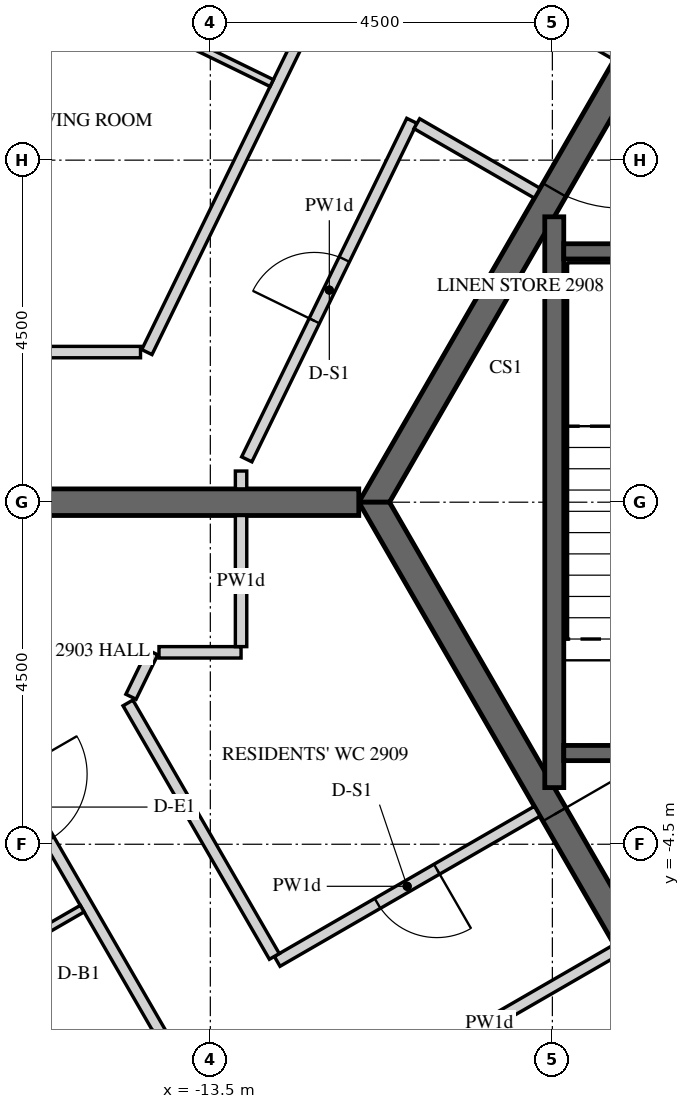
"""IFC4 building model, lengths in metres.
Left out: names, types, materials, properties, quantities, classifications, styles, units other than length and angle.
Written with IfcOpenShell. Run it as: python <this file> out.ifc"""

import sys

from ifc_helpers import new_model, si_unit, direction, frame, frame_2d, origin, place, context, subcontext, project, spatial, polyline, rectangle, outline, extrude, element, fill, save


model = new_model("IFC4")
c1 = context("Model", 3, precision=1e-05, world=origin(), true_north=direction((0.0, 1.0)))
c2 = subcontext(c1, "Body", "Model", "MODEL_VIEW")
j1 = project(units=[si_unit("LENGTHUNIT", "METRE"), si_unit("PLANEANGLEUNIT", "RADIAN")], contexts=[c1])
p1 = place(None, origin())
s1 = spatial("IfcSite", under=j1, at=p1, CompositionType="ELEMENT")
p2 = place(p1, origin())
s2 = spatial("IfcBuilding", under=s1, at=p2, CompositionType="ELEMENT")
p3 = place(p2, frame((0.0, 0.0, 369.0)))
s3 = spatial("IfcBuildingStorey", under=s2, at=p3, CompositionType="ELEMENT", Elevation=369.0)
p4 = place(p3, frame((-14.619, 19.699, -0.15), z_axis=(0.0, 0.0, 1.0), x_axis=(-0.438373747484, -0.898792777851, 0.0)))
e1 = element("IfcWall", 1, at=p4, inside=s3, PredefinedType="SOLIDWALL", context=c2, shape_type="SweptSolid", body=[
    extrude(outline(polyline([(0.225, -0.225), (20.506, -0.225), (20.957, 0.225), (-0.225, 0.225), (0.225, -0.225)])), origin(), (0.0, 0.0, 1.0), 3.9),
])
p5 = place(p4, frame((0.325, 0.0, 1.05)))
e2 = element("IfcOpeningElement", 2, at=p5, cuts=e1, PredefinedType="OPENING", context=c2, shape_type="SweptSolid", body=[
    extrude(rectangle(XDim=0.9, YDim=1.5, at=frame_2d((0.45, 0.75))), frame((0.0, 0.235, 0.0), z_axis=(0.0, -1.0, 0.0), x_axis=(1.0, 0.0, 0.0)), (0.0, 0.0, 1.0), 0.47),
])
p6 = place(p4, frame((1.525, 0.0, 0.15)))
e3 = element("IfcOpeningElement", 3, at=p6, cuts=e1, PredefinedType="OPENING", context=c2, shape_type="SweptSolid", body=[
    extrude(rectangle(XDim=1.2, YDim=2.4, at=frame_2d((0.6, 1.2))), frame((0.0, 0.235, 0.0), z_axis=(0.0, -1.0, 0.0), x_axis=(1.0, 0.0, 0.0)), (0.0, 0.0, 1.0), 0.47),
])
p7 = place(p4, frame((3.766, 0.0, 1.05)))
e4 = element("IfcOpeningElement", 4, at=p7, cuts=e1, PredefinedType="OPENING", context=c2, shape_type="SweptSolid", body=[
    extrude(rectangle(XDim=0.9, YDim=1.5, at=frame_2d((0.45, 0.75))), frame((0.0, 0.235, 0.0), z_axis=(0.0, -1.0, 0.0), x_axis=(1.0, 0.0, 0.0)), (0.0, 0.0, 1.0), 0.47),
])
p8 = place(p4, frame((4.966, 0.0, 0.15)))
e5 = element("IfcOpeningElement", 5, at=p8, cuts=e1, PredefinedType="OPENING", context=c2, shape_type="SweptSolid", body=[
    extrude(rectangle(XDim=1.2, YDim=2.4, at=frame_2d((0.6, 1.2))), frame((0.0, 0.235, 0.0), z_axis=(0.0, -1.0, 0.0), x_axis=(1.0, 0.0, 0.0)), (0.0, 0.0, 1.0), 0.47),
])
p9 = place(p4, frame((7.366, 0.0, 1.05)))
e6 = element("IfcOpeningElement", 6, at=p9, cuts=e1, PredefinedType="OPENING", context=c2, shape_type="SweptSolid", body=[
    extrude(rectangle(XDim=0.9, YDim=1.5, at=frame_2d((0.45, 0.75))), frame((0.0, 0.235, 0.0), z_axis=(0.0, -1.0, 0.0), x_axis=(1.0, 0.0, 0.0)), (0.0, 0.0, 1.0), 0.47),
])
p10 = place(p4, frame((8.566, 0.0, 0.15)))
e7 = element("IfcOpeningElement", 7, at=p10, cuts=e1, PredefinedType="OPENING", context=c2, shape_type="SweptSolid", body=[
    extrude(rectangle(XDim=1.2, YDim=2.4, at=frame_2d((0.6, 1.2))), frame((0.0, 0.235, 0.0), z_axis=(0.0, -1.0, 0.0), x_axis=(1.0, 0.0, 0.0)), (0.0, 0.0, 1.0), 0.47),
])
p11 = place(p4, frame((10.966, 0.0, 1.05)))
e8 = element("IfcOpeningElement", 8, at=p11, cuts=e1, PredefinedType="OPENING", context=c2, shape_type="SweptSolid", body=[
    extrude(rectangle(XDim=0.9, YDim=1.5, at=frame_2d((0.45, 0.75))), frame((0.0, 0.235, 0.0), z_axis=(0.0, -1.0, 0.0), x_axis=(1.0, 0.0, 0.0)), (0.0, 0.0, 1.0), 0.47),
])
p12 = place(p4, frame((12.166, 0.0, 0.15)))
e9 = element("IfcOpeningElement", 9, at=p12, cuts=e1, PredefinedType="OPENING", context=c2, shape_type="SweptSolid", body=[
    extrude(rectangle(XDim=1.2, YDim=2.4, at=frame_2d((0.6, 1.2))), frame((0.0, 0.235, 0.0), z_axis=(0.0, -1.0, 0.0), x_axis=(1.0, 0.0, 0.0)), (0.0, 0.0, 1.0), 0.47),
])
p13 = place(p4, frame((14.566, 0.0, 1.05)))
e10 = element("IfcOpeningElement", 10, at=p13, cuts=e1, PredefinedType="OPENING", context=c2, shape_type="SweptSolid", body=[
    extrude(rectangle(XDim=0.9, YDim=1.5, at=frame_2d((0.45, 0.75))), frame((0.0, 0.235, 0.0), z_axis=(0.0, -1.0, 0.0), x_axis=(1.0, 0.0, 0.0)), (0.0, 0.0, 1.0), 0.47),
])
p14 = place(p4, frame((15.766, 0.0, 0.15)))
e11 = element("IfcOpeningElement", 11, at=p14, cuts=e1, PredefinedType="OPENING", context=c2, shape_type="SweptSolid", body=[
    extrude(rectangle(XDim=1.2, YDim=2.4, at=frame_2d((0.6, 1.2))), frame((0.0, 0.235, 0.0), z_axis=(0.0, -1.0, 0.0), x_axis=(1.0, 0.0, 0.0)), (0.0, 0.0, 1.0), 0.47),
])
p15 = place(p4, frame((18.007, 0.0, 1.05)))
e12 = element("IfcOpeningElement", 12, at=p15, cuts=e1, PredefinedType="OPENING", context=c2, shape_type="SweptSolid", body=[
    extrude(rectangle(XDim=0.9, YDim=1.5, at=frame_2d((0.45, 0.75))), frame((0.0, 0.235, 0.0), z_axis=(0.0, -1.0, 0.0), x_axis=(1.0, 0.0, 0.0)), (0.0, 0.0, 1.0), 0.47),
])
p16 = place(p4, frame((19.207, 0.0, 0.15)))
e13 = element("IfcOpeningElement", 13, at=p16, cuts=e1, PredefinedType="OPENING", context=c2, shape_type="SweptSolid", body=[
    extrude(rectangle(XDim=1.2, YDim=2.4, at=frame_2d((0.6, 1.2))), frame((0.0, 0.235, 0.0), z_axis=(0.0, -1.0, 0.0), x_axis=(1.0, 0.0, 0.0)), (0.0, 0.0, 1.0), 0.47),
])
p17 = place(p3, frame((-25.907, -2.678, -0.15), z_axis=(0.0, 0.0, 1.0), x_axis=(0.499997453958, -0.866026873738, 0.0)))
e14 = element("IfcWall", 14, at=p17, inside=s3, PredefinedType="SOLIDWALL", context=c2, shape_type="SweptSolid", body=[
    extrude(outline(polyline([(-0.018, -0.225), (23.152, -0.225), (23.11, 0.225), (0.018, 0.225), (-0.018, -0.225)])), origin(), (0.0, 0.0, 1.0), 3.9),
])
p18 = place(p17, frame((1.366, 0.0, 0.45)))
e15 = element("IfcOpeningElement", 15, at=p18, cuts=e14, PredefinedType="OPENING", context=c2, shape_type="SweptSolid", body=[
    extrude(rectangle(XDim=2.4, YDim=3.0, at=frame_2d((1.2, 1.5))), frame((0.0, 0.235, 0.0), z_axis=(0.0, -1.0, 0.0), x_axis=(1.0, 0.0, 0.0)), (0.0, 0.0, 1.0), 0.47),
])
p19 = place(p17, frame((4.966, 0.0, 0.45)))
e16 = element("IfcOpeningElement", 16, at=p19, cuts=e14, PredefinedType="OPENING", context=c2, shape_type="SweptSolid", body=[
    extrude(rectangle(XDim=2.4, YDim=3.0, at=frame_2d((1.2, 1.5))), frame((0.0, 0.235, 0.0), z_axis=(0.0, -1.0, 0.0), x_axis=(1.0, 0.0, 0.0)), (0.0, 0.0, 1.0), 0.47),
])
p20 = place(p17, frame((8.566, 0.0, 0.45)))
e17 = element("IfcOpeningElement", 17, at=p20, cuts=e14, PredefinedType="OPENING", context=c2, shape_type="SweptSolid", body=[
    extrude(rectangle(XDim=2.4, YDim=3.0, at=frame_2d((1.2, 1.5))), frame((0.0, 0.235, 0.0), z_axis=(0.0, -1.0, 0.0), x_axis=(1.0, 0.0, 0.0)), (0.0, 0.0, 1.0), 0.47),
])
p21 = place(p17, frame((12.166, 0.0, 0.45)))
e18 = element("IfcOpeningElement", 18, at=p21, cuts=e14, PredefinedType="OPENING", context=c2, shape_type="SweptSolid", body=[
    extrude(rectangle(XDim=2.4, YDim=3.0, at=frame_2d((1.2, 1.5))), frame((0.0, 0.235, 0.0), z_axis=(0.0, -1.0, 0.0), x_axis=(1.0, 0.0, 0.0)), (0.0, 0.0, 1.0), 0.47),
])
p22 = place(p17, frame((15.766, 0.0, 0.45)))
e19 = element("IfcOpeningElement", 19, at=p22, cuts=e14, PredefinedType="OPENING", context=c2, shape_type="SweptSolid", body=[
    extrude(rectangle(XDim=2.4, YDim=3.0, at=frame_2d((1.2, 1.5))), frame((0.0, 0.235, 0.0), z_axis=(0.0, -1.0, 0.0), x_axis=(1.0, 0.0, 0.0)), (0.0, 0.0, 1.0), 0.47),
])
p23 = place(p17, frame((19.366, 0.0, 0.45)))
e20 = element("IfcOpeningElement", 20, at=p23, cuts=e14, PredefinedType="OPENING", context=c2, shape_type="SweptSolid", body=[
    extrude(rectangle(XDim=2.4, YDim=3.0, at=frame_2d((1.2, 1.5))), frame((0.0, 0.235, 0.0), z_axis=(0.0, -1.0, 0.0), x_axis=(1.0, 0.0, 0.0)), (0.0, 0.0, 1.0), 0.47),
])
p24 = place(p3, frame((-5.673, 9.825, -0.15), z_axis=(0.0, 0.0, 1.0), x_axis=(-0.499995046907, -0.866028263435, 0.0)))
e21 = element("IfcWall", 21, at=p24, inside=s3, PredefinedType="SHEAR", context=c2, shape_type="SweptSolid", body=[
    extrude(outline(polyline([(-0.101, -0.175), (11.446, -0.175), (11.244, 0.175), (0.101, 0.175), (-0.101, -0.175)])), origin(), (0.0, 0.0, 1.0), 3.9),
])
p25 = place(p24, frame((4.801, 0.0, 0.15)))
e22 = element("IfcOpeningElement", 22, at=p25, cuts=e21, PredefinedType="OPENING", context=c2, shape_type="SweptSolid", body=[
    extrude(rectangle(XDim=1.8, YDim=2.4, at=frame_2d((0.9, 1.2))), frame((0.0, 0.185, 0.0), z_axis=(0.0, -1.0, 0.0), x_axis=(1.0, 0.0, 0.0)), (0.0, 0.0, 1.0), 0.37),
])
p26 = place(p3, frame((-11.345, 0.0, -0.15), z_axis=(0.0, 0.0, 1.0), x_axis=(0.499995046907, -0.866028263435, 0.0)))
e23 = element("IfcWall", 23, at=p26, inside=s3, PredefinedType="SHEAR", context=c2, shape_type="SweptSolid", body=[
    extrude(outline(polyline([(-0.101, -0.175), (11.446, -0.175), (11.244, 0.175), (0.101, 0.175), (-0.101, -0.175)])), origin(), (0.0, 0.0, 1.0), 3.9),
])
p27 = place(p26, frame((4.744, 0.0, 0.15)))
e24 = element("IfcOpeningElement", 24, at=p27, cuts=e23, PredefinedType="OPENING", context=c2, shape_type="SweptSolid", body=[
    extrude(rectangle(XDim=1.8, YDim=2.4, at=frame_2d((0.9, 1.2))), frame((0.0, 0.185, 0.0), z_axis=(0.0, -1.0, 0.0), x_axis=(1.0, 0.0, 0.0)), (0.0, 0.0, 1.0), 0.37),
])
p28 = place(p3, frame((-11.547, 0.0, -0.15), z_axis=(0.0, 0.0, 1.0), x_axis=(-1.0, 0.0, 0.0)))
e25 = element("IfcWall", 25, at=p28, inside=s3, PredefinedType="SHEAR", context=c2, shape_type="SweptSolid", body=[
    extrude(rectangle(XDim=14.51, YDim=0.35, at=frame_2d((7.255, 0.0))), origin(), (0.0, 0.0, 1.0), 3.9),
])
p29 = place(p28, frame((6.355, 0.0, 0.15)))
e26 = element("IfcOpeningElement", 26, at=p29, cuts=e25, PredefinedType="OPENING", context=c2, shape_type="SweptSolid", body=[
    extrude(rectangle(XDim=1.8, YDim=2.4, at=frame_2d((0.9, 1.2))), frame((0.0, 0.185, 0.0), z_axis=(0.0, -1.0, 0.0), x_axis=(1.0, 0.0, 0.0)), (0.0, 0.0, 1.0), 0.37),
])
p30 = place(p3, frame((-8.975, -3.755, -0.25), z_axis=(0.0, 0.0, 1.0), x_axis=(0.0, 1.0, 0.0)))
e27 = element("IfcWall", 27, at=p30, inside=s3, PredefinedType="SHEAR", context=c2, shape_type="SweptSolid", body=[
    extrude(rectangle(XDim=7.51, YDim=0.25, at=frame_2d((3.755, 0.0))), origin(), (0.0, 0.0, 1.0), 3.9),
])
p31 = place(p3, frame((-8.85, 3.3, -0.25), z_axis=(0.0, 0.0, 1.0), x_axis=(1.0, 0.0, 0.0)))
e28 = element("IfcWall", 28, at=p31, inside=s3, PredefinedType="SHEAR", context=c2, shape_type="SweptSolid", body=[
    extrude(rectangle(XDim=2.95, YDim=0.2, at=frame_2d((1.475, 0.0))), origin(), (0.0, 0.0, 1.0), 3.9),
])
p32 = place(p3, frame((-8.85, -3.3, -0.25), z_axis=(0.0, 0.0, 1.0), x_axis=(1.0, 0.0, 0.0)))
e29 = element("IfcWall", 29, at=p32, inside=s3, PredefinedType="SHEAR", context=c2, shape_type="SweptSolid", body=[
    extrude(rectangle(XDim=2.95, YDim=0.2, at=frame_2d((1.475, 0.0))), origin(), (0.0, 0.0, 1.0), 3.9),
])
p33 = place(p32, frame((0.875, 0.0, 0.25)))
e30 = element("IfcOpeningElement", 30, at=p33, cuts=e29, PredefinedType="OPENING", context=c2, shape_type="SweptSolid", body=[
    extrude(rectangle(XDim=1.2, YDim=2.4, at=frame_2d((0.6, 1.2))), frame((0.0, 0.11, 0.0), z_axis=(0.0, -1.0, 0.0), x_axis=(1.0, 0.0, 0.0)), (0.0, 0.0, 1.0), 0.22),
])
p34 = place(p3, frame((-7.653, 15.675, 0.0), z_axis=(0.0, 0.0, 1.0), x_axis=(-0.438369669055, -0.898794767037, 0.0)))
e31 = element("IfcWall", 31, at=p34, inside=s3, PredefinedType="PARTITIONING", context=c2, shape_type="SweptSolid", body=[
    extrude(rectangle(XDim=15.243, YDim=0.15, at=frame_2d((7.621, 0.0))), origin(), (0.0, 0.0, 1.0), 2.47),
])
p35 = place(p34, frame((2.942, 0.0, 0.0)))
e32 = element("IfcOpeningElement", 32, at=p35, cuts=e31, PredefinedType="OPENING", context=c2, shape_type="SweptSolid", body=[
    extrude(rectangle(XDim=1.0, YDim=2.1, at=frame_2d((0.5, 1.05))), frame((0.0, 0.085, 0.0), z_axis=(0.0, -1.0, 0.0), x_axis=(1.0, 0.0, 0.0)), (0.0, 0.0, 1.0), 0.17),
])
p36 = place(p3, frame((-14.418, 1.975, 0.0), z_axis=(0.0, 0.0, 1.0), x_axis=(-1.0, 0.0, 0.0)))
e33 = element("IfcWall", 33, at=p36, inside=s3, PredefinedType="PARTITIONING", context=c2, shape_type="SweptSolid", body=[
    extrude(rectangle(XDim=5.784, YDim=0.15, at=frame_2d((2.892, 0.0))), origin(), (0.0, 0.0, 1.0), 2.47),
])
p37 = place(p3, frame((-8.15, 5.884, 0.0), z_axis=(0.0, 0.0, 1.0), x_axis=(-0.866007146345, 0.50003162148, 0.0)))
e34 = element("IfcWall", 34, at=p37, inside=s3, PredefinedType="PARTITIONING", context=c2, shape_type="SweptSolid", body=[
    extrude(rectangle(XDim=2.051, YDim=0.15, at=frame_2d((1.025, 0.0))), origin(), (0.0, 0.0, 1.0), 2.47),
])
p38 = place(p3, frame((-13.096, 0.175, 0.0), z_axis=(0.0, 0.0, 1.0), x_axis=(0.0, 1.0, 0.0)))
e35 = element("IfcWall", 35, at=p38, inside=s3, PredefinedType="PARTITIONING", context=c2, shape_type="SweptSolid", body=[
    extrude(rectangle(XDim=0.235, YDim=0.15, at=frame_2d((0.118, 0.0))), origin(), (0.0, 0.0, 1.0), 2.47),
])
p39 = place(p3, frame((-13.021, 0.564, 0.0), z_axis=(0.0, 0.0, 1.0), x_axis=(0.438343062662, 0.8988077433, 0.0)))
e36 = element("IfcWall", 36, at=p39, inside=s3, PredefinedType="PARTITIONING", context=c2, shape_type="SweptSolid", body=[
    extrude(rectangle(XDim=4.955, YDim=0.15, at=frame_2d((2.478, 0.0))), origin(), (0.0, 0.0, 1.0), 2.47),
])
p40 = place(p39, frame((2.028, 0.0, 0.0)))
e37 = element("IfcOpeningElement", 37, at=p40, cuts=e36, PredefinedType="OPENING", context=c2, shape_type="SweptSolid", body=[
    extrude(rectangle(XDim=0.9, YDim=2.1, at=frame_2d((0.45, 1.05))), frame((0.0, 0.085, 0.0), z_axis=(0.0, -1.0, 0.0), x_axis=(1.0, 0.0, 0.0)), (0.0, 0.0, 1.0), 0.17),
])
p41 = place(p3, frame((-10.783, 4.98, 0.0), z_axis=(0.0, 0.0, 1.0), x_axis=(0.866007702746, -0.500030657845, 0.0)))
e38 = element("IfcWall", 38, at=p41, inside=s3, PredefinedType="PARTITIONING", context=c2, shape_type="SweptSolid", body=[
    extrude(rectangle(XDim=1.829, YDim=0.15, at=frame_2d((0.914, 0.0))), origin(), (0.0, 0.0, 1.0), 2.47),
])
p42 = place(p3, frame((-16.583, -2.777, 0.0), z_axis=(0.0, 0.0, 1.0), x_axis=(0.50000467473, -0.866022704811, 0.0)))
e39 = element("IfcWall", 39, at=p42, inside=s3, PredefinedType="PARTITIONING", context=c2, shape_type="SweptSolid", body=[
    extrude(rectangle(XDim=13.504, YDim=0.15, at=frame_2d((6.752, 0.0))), origin(), (0.0, 0.0, 1.0), 2.47),
])
p43 = place(p42, frame((0.925, 0.0, 0.0)))
e40 = element("IfcOpeningElement", 40, at=p43, cuts=e39, PredefinedType="OPENING", context=c2, shape_type="SweptSolid", body=[
    extrude(rectangle(XDim=1.0, YDim=2.1, at=frame_2d((0.5, 1.05))), frame((0.0, 0.085, 0.0), z_axis=(0.0, -1.0, 0.0), x_axis=(1.0, 0.0, 0.0)), (0.0, 0.0, 1.0), 0.17),
])
p44 = place(p3, frame((-9.2, -4.066, 0.0), z_axis=(0.0, 0.0, 1.0), x_axis=(-0.866020906874, -0.500007788796, 0.0)))
e41 = element("IfcWall", 41, at=p44, inside=s3, PredefinedType="PARTITIONING", context=c2, shape_type="SweptSolid", body=[
    extrude(rectangle(XDim=3.95, YDim=0.15, at=frame_2d((1.975, 0.0))), origin(), (0.0, 0.0, 1.0), 2.47),
])
p45 = place(p44, frame((1.525, 0.0, 0.0)))
e42 = element("IfcOpeningElement", 42, at=p45, cuts=e41, PredefinedType="OPENING", context=c2, shape_type="SweptSolid", body=[
    extrude(rectangle(XDim=0.9, YDim=2.1, at=frame_2d((0.45, 1.05))), frame((0.0, 0.085, 0.0), z_axis=(0.0, -1.0, 0.0), x_axis=(1.0, 0.0, 0.0)), (0.0, 0.0, 1.0), 0.17),
])
p46 = place(p3, frame((-12.658, -5.976, 0.0), z_axis=(0.0, 0.0, 1.0), x_axis=(-0.499991345342, 0.866030400496, 0.0)))
e43 = element("IfcWall", 43, at=p46, inside=s3, PredefinedType="PARTITIONING", context=c2, shape_type="SweptSolid", body=[
    extrude(rectangle(XDim=3.851, YDim=0.15, at=frame_2d((1.926, 0.0))), origin(), (0.0, 0.0, 1.0), 2.47),
])
p47 = place(p3, frame((-14.544, -2.559, 0.0), z_axis=(0.0, 0.0, 1.0), x_axis=(0.438630789999, 0.898667363414, 0.0)))
e44 = element("IfcWall", 44, at=p47, inside=s3, PredefinedType="PARTITIONING", context=c2, shape_type="SweptSolid", body=[
    extrude(rectangle(XDim=0.65, YDim=0.15, at=frame_2d((0.325, 0.0))), origin(), (0.0, 0.0, 1.0), 2.47),
])
p48 = place(p3, frame((-14.176, -1.975, 0.0), z_axis=(0.0, 0.0, 1.0), x_axis=(1.0, 0.0, 0.0)))
e45 = element("IfcWall", 45, at=p48, inside=s3, PredefinedType="PARTITIONING", context=c2, shape_type="SweptSolid", body=[
    extrude(rectangle(XDim=1.08, YDim=0.15, at=frame_2d((0.54, 0.0))), origin(), (0.0, 0.0, 1.0), 2.47),
])
p49 = place(p3, frame((-13.096, -1.9, 0.0), z_axis=(0.0, 0.0, 1.0), x_axis=(0.0, 1.0, 0.0)))
e46 = element("IfcWall", 46, at=p49, inside=s3, PredefinedType="PARTITIONING", context=c2, shape_type="SweptSolid", body=[
    extrude(rectangle(XDim=1.725, YDim=0.15, at=frame_2d((0.862, 0.0))), origin(), (0.0, 0.0, 1.0), 2.47),
])
p50 = place(p3, frame((-11.506, -7.822, 0.0), z_axis=(0.0, 0.0, 1.0), x_axis=(0.866032409438, 0.499987865656, 0.0)))
e47 = element("IfcWall", 47, at=p50, inside=s3, PredefinedType="PARTITIONING", context=c2, shape_type="SweptSolid", body=[
    extrude(rectangle(XDim=3.875, YDim=0.15, at=frame_2d((1.938, 0.0))), origin(), (0.0, 0.0, 1.0), 2.47),
])
p51 = place(p3, frame((-12.692, 5.514, 0.0), z_axis=(0.0, 0.0, 1.0), x_axis=(-0.898787574002, 0.438384416717, 0.0)))
e48 = element("IfcWall", 48, at=p51, inside=s3, PredefinedType="PARTITIONING", context=c2, shape_type="SweptSolid", body=[
    extrude(rectangle(XDim=3.925, YDim=0.1, at=frame_2d((1.962, 0.0))), origin(), (0.0, 0.0, 1.0), 2.47),
])
p52 = place(p3, frame((-18.239, -7.11, 0.0), z_axis=(0.0, 0.0, 1.0), x_axis=(0.866031034943, 0.499990246421, 0.0)))
e49 = element("IfcWall", 49, at=p52, inside=s3, PredefinedType="PARTITIONING", context=c2, shape_type="SweptSolid", body=[
    extrude(rectangle(XDim=3.525, YDim=0.1, at=frame_2d((1.762, 0.0))), origin(), (0.0, 0.0, 1.0), 2.47),
])
p53 = place(p52, frame((1.4, 0.0, 0.0)))
e50 = element("IfcOpeningElement", 50, at=p53, cuts=e49, PredefinedType="OPENING", context=c2, shape_type="SweptSolid", body=[
    extrude(rectangle(XDim=0.8, YDim=2.1, at=frame_2d((0.4, 1.05))), frame((0.0, 0.06, 0.0), z_axis=(0.0, -1.0, 0.0), x_axis=(1.0, 0.0, 0.0)), (0.0, 0.0, 1.0), 0.12),
])
p54 = place(p25, origin())
e51 = element("IfcDoor", 51, at=p54, inside=s3, OperationType="DOUBLE_DOOR_SINGLE_SWING", PredefinedType="DOOR", context=c2, shape_type="SweptSolid", body=[
    extrude(rectangle(XDim=1.8, YDim=2.4, at=frame_2d((0.9, 1.2))), frame((0.0, 0.025, 0.0), z_axis=(0.0, -1.0, 0.0), x_axis=(1.0, 0.0, 0.0)), (0.0, 0.0, 1.0), 0.05),
])
fill(e22, e51)
p55 = place(p27, origin())
e52 = element("IfcDoor", 52, at=p55, inside=s3, OperationType="DOUBLE_DOOR_SINGLE_SWING", PredefinedType="DOOR", context=c2, shape_type="SweptSolid", body=[
    extrude(rectangle(XDim=1.8, YDim=2.4, at=frame_2d((0.9, 1.2))), frame((0.0, 0.025, 0.0), z_axis=(0.0, -1.0, 0.0), x_axis=(1.0, 0.0, 0.0)), (0.0, 0.0, 1.0), 0.05),
])
fill(e24, e52)
p56 = place(p40, origin())
e53 = element("IfcDoor", 53, at=p56, inside=s3, OperationType="SINGLE_SWING_LEFT", PredefinedType="DOOR", context=c2, shape_type="SweptSolid", body=[
    extrude(rectangle(XDim=0.9, YDim=2.1, at=frame_2d((0.45, 1.05))), frame((0.0, 0.025, 0.0), z_axis=(0.0, -1.0, 0.0), x_axis=(1.0, 0.0, 0.0)), (0.0, 0.0, 1.0), 0.05),
])
fill(e37, e53)
p57 = place(p45, origin())
e54 = element("IfcDoor", 54, at=p57, inside=s3, OperationType="SINGLE_SWING_LEFT", PredefinedType="DOOR", context=c2, shape_type="SweptSolid", body=[
    extrude(rectangle(XDim=0.9, YDim=2.1, at=frame_2d((0.45, 1.05))), frame((0.0, 0.025, 0.0), z_axis=(0.0, -1.0, 0.0), x_axis=(1.0, 0.0, 0.0)), (0.0, 0.0, 1.0), 0.05),
])
fill(e42, e54)
save(model, sys.argv[1])
